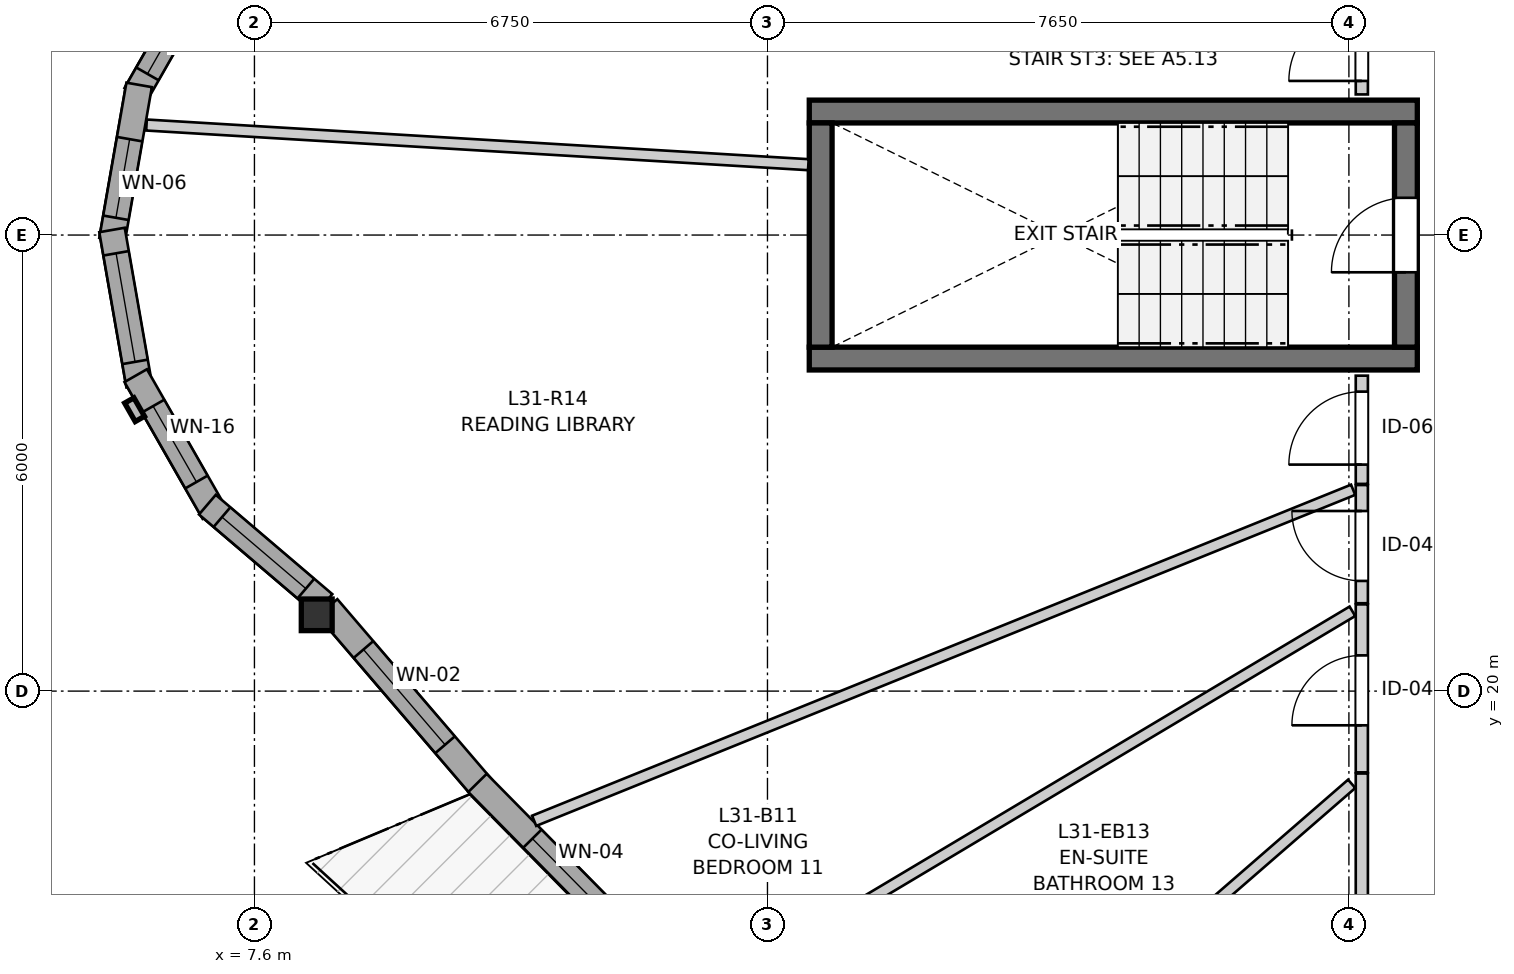
"""IFC4 building model, lengths in metres.
Left out: names, types, materials, properties, quantities, classifications, styles, units other than length and angle.
Written with IfcOpenShell. Run it as: python <this file> out.ifc"""

import sys

from ifc_helpers import new_model, si_unit, direction, frame, frame_2d, origin, origin_2d, place, context, subcontext, project, spatial, rectangle, i_section, extrude, source, transform, mapped, element, fill, save


model = new_model("IFC4")
c1 = context("Model", 3, precision=1e-05, world=origin(), true_north=direction((0.0, 1.0)))
c2 = subcontext(c1, "Body", "Model", "MODEL_VIEW")
j1 = project(units=[si_unit("LENGTHUNIT", "METRE"), si_unit("PLANEANGLEUNIT", "RADIAN")], contexts=[c1])
p1 = place(None, origin())
s1 = spatial("IfcSite", under=j1, at=p1, CompositionType="ELEMENT")
p2 = place(p1, origin())
s2 = spatial("IfcBuilding", under=s1, at=p2, CompositionType="ELEMENT")
p3 = place(p2, frame((0.0, 0.0, 105.6)))
s3 = spatial("IfcBuildingStorey", under=s2, at=p3, CompositionType="ELEMENT", Elevation=105.6)
for number, where, z_axis, x_axis in (
    (1, (14.9, 24.375, 0.0), (0.0, 0.0, 1.0), (1.0, 0.0, 0.0)),
    (2, (22.9, 27.625, 0.0), (0.0, 0.0, 1.0), (-1.0, 0.0, 0.0)),
):
    element("IfcWall", number, at=place(p3, frame(where, z_axis=z_axis, x_axis=x_axis)), inside=s3, PredefinedType="SHEAR", context=c2, shape_type="SweptSolid", body=[
        extrude(rectangle(XDim=8.0, YDim=0.3, at=frame_2d((4.0, 0.0))), origin(), (0.0, 0.0, 1.0), 2.935),
    ])
p4 = place(p3, frame((15.05, 27.475, 0.0), z_axis=(0.0, 0.0, 1.0), x_axis=(0.0, -1.0, 0.0)))
e3 = element("IfcWall", 3, at=p4, inside=s3, PredefinedType="SHEAR", context=c2, shape_type="SweptSolid", body=[
    extrude(rectangle(XDim=2.95, YDim=0.3, at=frame_2d((1.475, 0.0))), origin(), (0.0, 0.0, 1.0), 2.935),
])
p5 = place(p3, frame((22.75, 24.525, 0.0), z_axis=(0.0, 0.0, 1.0), x_axis=(0.0, 1.0, 0.0)))
e4 = element("IfcWall", 4, at=p5, inside=s3, PredefinedType="SHEAR", context=c2, shape_type="SweptSolid", body=[
    extrude(rectangle(XDim=2.95, YDim=0.3, at=frame_2d((1.475, 0.0))), origin(), (0.0, 0.0, 1.0), 2.935),
])
p6 = place(p5, frame((0.985, 0.0, 0.0)))
e5 = element("IfcOpeningElement", 5, at=p6, cuts=e4, PredefinedType="OPENING", context=c2, shape_type="SweptSolid", body=[
    extrude(rectangle(XDim=0.98, YDim=2.15, at=frame_2d((0.49, 1.075))), frame((0.0, 0.16, 0.0), z_axis=(0.0, -1.0, 0.0), x_axis=(1.0, 0.0, 0.0)), (0.0, 0.0, 1.0), 0.32),
])
m1 = source(origin(), c2, "Body", "SweptSolid", [
    extrude(i_section(OverallWidth=0.406, OverallDepth=0.416, WebThickness=0.027, FlangeThickness=0.044, FilletRadius=0.015, at=origin_2d()), origin(), (0.0, 0.0, 1.0), 2.935),
])
p7 = place(p3, frame((8.419, 21.004, 0.0), z_axis=(0.0, 0.0, 1.0), x_axis=(1.0, 0.0, 0.0)))
e6 = element("IfcColumn", 6, at=p7, inside=s3, PredefinedType="PILASTER", context=c2, shape_type="MappedRepresentation", body=[
    mapped(m1, transform((0.0, 0.0, 0.0), x_axis=(1.0, 0.0, 0.0), y_axis=(0.0, 1.0, 0.0), z_axis=(0.0, 0.0, 1.0), scale=1.0)),
])
p8 = place(p3, frame((7.066, 29.65, 0.0), z_axis=(0.0, 0.0, 1.0), x_axis=(-0.496037473582, -0.868301114132, 0.0)))
e7 = element("IfcWall", 7, at=p8, inside=s3, PredefinedType="SOLIDWALL", context=c2, shape_type="SweptSolid", body=[
    extrude(rectangle(XDim=2.073, YDim=0.34, at=frame_2d((1.037, 0.0))), origin(), (0.0, 0.0, 1.0), 2.465),
])
p9 = place(p8, frame((0.312, 0.0, 0.82)))
e8 = element("IfcOpeningElement", 8, at=p9, cuts=e7, PredefinedType="OPENING", context=c2, shape_type="SweptSolid", body=[
    extrude(rectangle(XDim=1.45, YDim=1.25, at=frame_2d((0.725, 0.625))), frame((0.0, 0.18, 0.0), z_axis=(0.0, -1.0, 0.0), x_axis=(1.0, 0.0, 0.0)), (0.0, 0.0, 1.0), 0.36),
])
p10 = place(p3, frame((6.083, 27.975, 0.0), z_axis=(0.0, 0.0, 1.0), x_axis=(-0.172186061474, -0.985064444711, 0.0)))
e9 = element("IfcWall", 9, at=p10, inside=s3, PredefinedType="SOLIDWALL", context=c2, shape_type="SweptSolid", body=[
    extrude(rectangle(XDim=2.073, YDim=0.34, at=frame_2d((1.037, 0.0))), origin(), (0.0, 0.0, 1.0), 2.465),
])
p11 = place(p10, frame((0.725, 0.0, 0.82)))
e10 = element("IfcOpeningElement", 10, at=p11, cuts=e9, PredefinedType="OPENING", context=c2, shape_type="SweptSolid", body=[
    extrude(rectangle(XDim=1.05, YDim=1.45, at=frame_2d((0.525, 0.725))), frame((0.0, 0.18, 0.0), z_axis=(0.0, -1.0, 0.0), x_axis=(1.0, 0.0, 0.0)), (0.0, 0.0, 1.0), 0.36),
])
p12 = place(p3, frame((5.726, 26.067, 0.0), z_axis=(0.0, 0.0, 1.0), x_axis=(0.172186061474, -0.985064444711, 0.0)))
e11 = element("IfcWall", 11, at=p12, inside=s3, PredefinedType="SOLIDWALL", context=c2, shape_type="SweptSolid", body=[
    extrude(rectangle(XDim=2.073, YDim=0.34, at=frame_2d((1.037, 0.0))), origin(), (0.0, 0.0, 1.0), 2.465),
])
p13 = place(p12, frame((0.312, 0.0, 0.82)))
e12 = element("IfcOpeningElement", 12, at=p13, cuts=e11, PredefinedType="OPENING", context=c2, shape_type="SweptSolid", body=[
    extrude(rectangle(XDim=1.45, YDim=1.25, at=frame_2d((0.725, 0.625))), frame((0.0, 0.18, 0.0), z_axis=(0.0, -1.0, 0.0), x_axis=(1.0, 0.0, 0.0)), (0.0, 0.0, 1.0), 0.36),
])
p14 = place(p3, frame((6.038, 24.15, 0.0), z_axis=(0.0, 0.0, 1.0), x_axis=(0.496037473582, -0.868301114132, 0.0)))
e13 = element("IfcWall", 13, at=p14, inside=s3, PredefinedType="SOLIDWALL", context=c2, shape_type="SweptSolid", body=[
    extrude(rectangle(XDim=2.073, YDim=0.34, at=frame_2d((1.037, 0.0))), origin(), (0.0, 0.0, 1.0), 2.465),
])
p15 = place(p14, frame((0.461, 0.0, 0.82)))
e14 = element("IfcOpeningElement", 14, at=p15, cuts=e13, PredefinedType="OPENING", context=c2, shape_type="SweptSolid", body=[
    extrude(rectangle(XDim=1.15, YDim=1.2, at=frame_2d((0.575, 0.6))), frame((0.0, 0.18, 0.0), z_axis=(0.0, -1.0, 0.0), x_axis=(1.0, 0.0, 0.0)), (0.0, 0.0, 1.0), 0.36),
])
p16 = place(p3, frame((6.981, 22.453, 0.0), z_axis=(0.0, 0.0, 1.0), x_axis=(0.761092561451, -0.648643286332, 0.0)))
e15 = element("IfcWall", 15, at=p16, inside=s3, PredefinedType="SOLIDWALL", context=c2, shape_type="SweptSolid", body=[
    extrude(rectangle(XDim=2.015, YDim=0.34, at=frame_2d((1.007, 0.0))), origin(), (0.0, 0.0, 1.0), 2.465),
])
p17 = place(p16, frame((0.252, 0.0, 0.82)))
e16 = element("IfcOpeningElement", 16, at=p17, cuts=e15, PredefinedType="OPENING", context=c2, shape_type="SweptSolid", body=[
    extrude(rectangle(XDim=1.45, YDim=1.25, at=frame_2d((0.725, 0.625))), frame((0.0, 0.18, 0.0), z_axis=(0.0, -1.0, 0.0), x_axis=(1.0, 0.0, 0.0)), (0.0, 0.0, 1.0), 0.36),
])
p18 = place(p3, frame((8.562, 21.099, 0.0), z_axis=(0.0, 0.0, 1.0), x_axis=(0.650778499588, -0.75926763692, 0.0)))
e17 = element("IfcWall", 17, at=p18, inside=s3, PredefinedType="SOLIDWALL", context=c2, shape_type="SweptSolid", body=[
    extrude(rectangle(XDim=3.124, YDim=0.34, at=frame_2d((1.562, 0.0))), origin(), (0.0, 0.0, 1.0), 2.465),
])
p19 = place(p18, frame((0.727, 0.0, 0.82)))
e18 = element("IfcOpeningElement", 18, at=p19, cuts=e17, PredefinedType="OPENING", context=c2, shape_type="SweptSolid", body=[
    extrude(rectangle(XDim=1.65, YDim=1.45, at=frame_2d((0.825, 0.725))), frame((0.0, 0.18, 0.0), z_axis=(0.0, -1.0, 0.0), x_axis=(1.0, 0.0, 0.0)), (0.0, 0.0, 1.0), 0.36),
])
p20 = place(p3, frame((10.535, 18.792, 0.0), z_axis=(0.0, 0.0, 1.0), x_axis=(0.701902141766, -0.7122733909, 0.0)))
e19 = element("IfcWall", 19, at=p20, inside=s3, PredefinedType="SOLIDWALL", context=c2, shape_type="SweptSolid", body=[
    extrude(rectangle(XDim=2.848, YDim=0.34, at=frame_2d((1.424, 0.0))), origin(), (0.0, 0.0, 1.0), 2.465),
])
p21 = place(p20, frame((1.029, 0.0, 0.82)))
e20 = element("IfcOpeningElement", 20, at=p21, cuts=e19, PredefinedType="OPENING", context=c2, shape_type="SweptSolid", body=[
    extrude(rectangle(XDim=1.35, YDim=1.45, at=frame_2d((0.675, 0.725))), frame((0.0, 0.18, 0.0), z_axis=(0.0, -1.0, 0.0), x_axis=(1.0, 0.0, 0.0)), (0.0, 0.0, 1.0), 0.36),
])
p22 = place(p3, frame((22.17, 15.57, 0.0), z_axis=(0.0, 0.0, 1.0), x_axis=(0.0, 1.0, 0.0)))
e21 = element("IfcWall", 21, at=p22, inside=s3, PredefinedType="PARTITIONING", context=c2, shape_type="SweptSolid", body=[
    extrude(rectangle(XDim=3.346, YDim=0.16, at=frame_2d((1.673, 0.0))), origin(), (0.0, 0.0, 1.0), 2.935),
])
p23 = place(p22, frame((0.22, 0.0, 0.0)))
e22 = element("IfcOpeningElement", 22, at=p23, cuts=e21, PredefinedType="OPENING", context=c2, shape_type="SweptSolid", body=[
    extrude(rectangle(XDim=0.92, YDim=2.1, at=frame_2d((0.46, 1.05))), frame((0.0, 0.09, 0.0), z_axis=(0.0, -1.0, 0.0), x_axis=(1.0, 0.0, 0.0)), (0.0, 0.0, 1.0), 0.18),
])
p24 = place(p3, frame((22.17, 18.931, 0.0), z_axis=(0.0, 0.0, 1.0), x_axis=(0.0, 1.0, 0.0)))
e23 = element("IfcWall", 23, at=p24, inside=s3, PredefinedType="PARTITIONING", context=c2, shape_type="SweptSolid", body=[
    extrude(rectangle(XDim=2.21, YDim=0.16, at=frame_2d((1.105, 0.0))), origin(), (0.0, 0.0, 1.0), 2.935),
])
p25 = place(p24, frame((0.619, 0.0, 0.0)))
e24 = element("IfcOpeningElement", 24, at=p25, cuts=e23, PredefinedType="OPENING", context=c2, shape_type="SweptSolid", body=[
    extrude(rectangle(XDim=0.92, YDim=2.1, at=frame_2d((0.46, 1.05))), frame((0.0, 0.09, 0.0), z_axis=(0.0, -1.0, 0.0), x_axis=(1.0, 0.0, 0.0)), (0.0, 0.0, 1.0), 0.18),
])
p26 = place(p3, frame((22.17, 21.156, 0.0), z_axis=(0.0, 0.0, 1.0), x_axis=(0.0, 1.0, 0.0)))
e25 = element("IfcWall", 25, at=p26, inside=s3, PredefinedType="PARTITIONING", context=c2, shape_type="SweptSolid", body=[
    extrude(rectangle(XDim=1.555, YDim=0.16, at=frame_2d((0.777, 0.0))), origin(), (0.0, 0.0, 1.0), 2.935),
])
p27 = place(p26, frame((0.293, 0.0, 0.0)))
e26 = element("IfcOpeningElement", 26, at=p27, cuts=e25, PredefinedType="OPENING", context=c2, shape_type="SweptSolid", body=[
    extrude(rectangle(XDim=0.92, YDim=2.1, at=frame_2d((0.46, 1.05))), frame((0.0, 0.09, 0.0), z_axis=(0.0, -1.0, 0.0), x_axis=(1.0, 0.0, 0.0)), (0.0, 0.0, 1.0), 0.18),
])
p28 = place(p3, frame((22.17, 22.726, 0.0), z_axis=(0.0, 0.0, 1.0), x_axis=(0.0, 1.0, 0.0)))
e27 = element("IfcWall", 27, at=p28, inside=s3, PredefinedType="PARTITIONING", context=c2, shape_type="SweptSolid", body=[
    extrude(rectangle(XDim=1.424, YDim=0.16, at=frame_2d((0.712, 0.0))), origin(), (0.0, 0.0, 1.0), 2.935),
])
p29 = place(p28, frame((0.254, 0.0, 0.0)))
e28 = element("IfcOpeningElement", 28, at=p29, cuts=e27, PredefinedType="OPENING", context=c2, shape_type="SweptSolid", body=[
    extrude(rectangle(XDim=0.96, YDim=2.1, at=frame_2d((0.48, 1.05))), frame((0.0, 0.09, 0.0), z_axis=(0.0, -1.0, 0.0), x_axis=(1.0, 0.0, 0.0)), (0.0, 0.0, 1.0), 0.18),
])
p30 = place(p3, frame((22.17, 27.85, 0.0), z_axis=(0.0, 0.0, 1.0), x_axis=(0.0, 1.0, 0.0)))
e29 = element("IfcWall", 29, at=p30, inside=s3, PredefinedType="PARTITIONING", context=c2, shape_type="SweptSolid", body=[
    extrude(rectangle(XDim=1.283, YDim=0.16, at=frame_2d((0.642, 0.0))), origin(), (0.0, 0.0, 1.0), 2.935),
])
p31 = place(p30, frame((0.177, 0.0, 0.0)))
e30 = element("IfcOpeningElement", 30, at=p31, cuts=e29, PredefinedType="OPENING", context=c2, shape_type="SweptSolid", body=[
    extrude(rectangle(XDim=0.96, YDim=2.1, at=frame_2d((0.48, 1.05))), frame((0.0, 0.09, 0.0), z_axis=(0.0, -1.0, 0.0), x_axis=(1.0, 0.0, 0.0)), (0.0, 0.0, 1.0), 0.18),
])
p32 = place(p3, frame((11.28, 18.294, 0.0), z_axis=(0.0, 0.0, 1.0), x_axis=(0.927137862507, 0.374720407645, 0.0)))
e31 = element("IfcWall", 31, at=p32, inside=s3, PredefinedType="PARTITIONING", context=c2, shape_type="SweptSolid", body=[
    extrude(rectangle(XDim=11.622, YDim=0.145, at=frame_2d((5.811, 0.0))), origin(), (0.0, 0.0, 1.0), 2.935),
])
p33 = place(p3, frame((13.622, 16.028, 0.0), z_axis=(0.0, 0.0, 1.0), x_axis=(0.85896108151, 0.512040877716, 0.0)))
e32 = element("IfcWall", 32, at=p33, inside=s3, PredefinedType="PARTITIONING", context=c2, shape_type="SweptSolid", body=[
    extrude(rectangle(XDim=9.807, YDim=0.145, at=frame_2d((4.904, 0.0))), origin(), (0.0, 0.0, 1.0), 2.935),
])
p34 = place(p3, frame((6.18, 27.448, 0.0), z_axis=(0.0, 0.0, 1.0), x_axis=(0.998209995059, -0.059806402362, 0.0)))
e33 = element("IfcWall", 33, at=p34, inside=s3, PredefinedType="PARTITIONING", context=c2, shape_type="SweptSolid", body=[
    extrude(rectangle(XDim=8.724, YDim=0.145, at=frame_2d((4.362, 0.0))), origin(), (0.0, 0.0, 1.0), 2.935),
])
p35 = place(p3, frame((19.736, 16.782, 0.0), z_axis=(0.0, 0.0, 1.0), x_axis=(0.754964216329, 0.655765988796, 0.0)))
e34 = element("IfcWall", 34, at=p35, inside=s3, PredefinedType="PARTITIONING", context=c2, shape_type="SweptSolid", body=[
    extrude(rectangle(XDim=3.047, YDim=0.145, at=frame_2d((1.523, 0.0))), origin(), (0.0, 0.0, 1.0), 2.935),
])
m2 = source(origin(), c2, "Body", "SweptSolid", [
    extrude(rectangle(XDim=1.45, YDim=1.25, at=frame_2d((0.725, 0.625))), frame((0.0, 0.03, 0.0), z_axis=(0.0, -1.0, 0.0), x_axis=(1.0, 0.0, 0.0)), (0.0, 0.0, 1.0), 0.06),
])
p36 = place(p9, origin())
e35 = element("IfcWindow", 35, at=p36, inside=s3, PartitioningType="SINGLE_PANEL", PredefinedType="WINDOW", context=c2, shape_type="MappedRepresentation", body=[
    mapped(m2, transform((0.0, 0.0, 0.0), x_axis=(1.0, 0.0, 0.0), y_axis=(0.0, 1.0, 0.0), z_axis=(0.0, 0.0, 1.0), scale=1.0)),
])
fill(e8, e35)
m3 = source(origin(), c2, "Body", "SweptSolid", [
    extrude(rectangle(XDim=1.05, YDim=1.45, at=frame_2d((0.525, 0.725))), frame((0.0, 0.03, 0.0), z_axis=(0.0, -1.0, 0.0), x_axis=(1.0, 0.0, 0.0)), (0.0, 0.0, 1.0), 0.06),
])
p37 = place(p11, origin())
e36 = element("IfcWindow", 36, at=p37, inside=s3, PartitioningType="SINGLE_PANEL", PredefinedType="WINDOW", context=c2, shape_type="MappedRepresentation", body=[
    mapped(m3, transform((0.0, 0.0, 0.0), x_axis=(1.0, 0.0, 0.0), y_axis=(0.0, 1.0, 0.0), z_axis=(0.0, 0.0, 1.0), scale=1.0)),
])
fill(e10, e36)
p38 = place(p13, origin())
e37 = element("IfcWindow", 37, at=p38, inside=s3, PartitioningType="SINGLE_PANEL", PredefinedType="WINDOW", context=c2, shape_type="MappedRepresentation", body=[
    mapped(m2, transform((0.0, 0.0, 0.0), x_axis=(1.0, 0.0, 0.0), y_axis=(0.0, 1.0, 0.0), z_axis=(0.0, 0.0, 1.0), scale=1.0)),
])
fill(e12, e37)
m4 = source(origin(), c2, "Body", "SweptSolid", [
    extrude(rectangle(XDim=1.15, YDim=1.2, at=frame_2d((0.575, 0.6))), frame((0.0, 0.03, 0.0), z_axis=(0.0, -1.0, 0.0), x_axis=(1.0, 0.0, 0.0)), (0.0, 0.0, 1.0), 0.06),
])
p39 = place(p15, origin())
e38 = element("IfcWindow", 38, at=p39, inside=s3, PartitioningType="SINGLE_PANEL", PredefinedType="WINDOW", context=c2, shape_type="MappedRepresentation", body=[
    mapped(m4, transform((0.0, 0.0, 0.0), x_axis=(1.0, 0.0, 0.0), y_axis=(0.0, 1.0, 0.0), z_axis=(0.0, 0.0, 1.0), scale=1.0)),
])
fill(e14, e38)
p40 = place(p17, origin())
e39 = element("IfcWindow", 39, at=p40, inside=s3, PartitioningType="SINGLE_PANEL", PredefinedType="WINDOW", context=c2, shape_type="MappedRepresentation", body=[
    mapped(m2, transform((0.0, 0.0, 0.0), x_axis=(1.0, 0.0, 0.0), y_axis=(0.0, 1.0, 0.0), z_axis=(0.0, 0.0, 1.0), scale=1.0)),
])
fill(e16, e39)
m5 = source(origin(), c2, "Body", "SweptSolid", [
    extrude(rectangle(XDim=1.65, YDim=1.45, at=frame_2d((0.825, 0.725))), frame((0.0, 0.03, 0.0), z_axis=(0.0, -1.0, 0.0), x_axis=(1.0, 0.0, 0.0)), (0.0, 0.0, 1.0), 0.06),
])
p41 = place(p19, origin())
e40 = element("IfcWindow", 40, at=p41, inside=s3, PartitioningType="SINGLE_PANEL", PredefinedType="WINDOW", context=c2, shape_type="MappedRepresentation", body=[
    mapped(m5, transform((0.0, 0.0, 0.0), x_axis=(1.0, 0.0, 0.0), y_axis=(0.0, 1.0, 0.0), z_axis=(0.0, 0.0, 1.0), scale=1.0)),
])
fill(e18, e40)
m6 = source(origin(), c2, "Body", "SweptSolid", [
    extrude(rectangle(XDim=1.35, YDim=1.45, at=frame_2d((0.675, 0.725))), frame((0.0, 0.03, 0.0), z_axis=(0.0, -1.0, 0.0), x_axis=(1.0, 0.0, 0.0)), (0.0, 0.0, 1.0), 0.06),
])
p42 = place(p21, origin())
e41 = element("IfcWindow", 41, at=p42, inside=s3, PartitioningType="SINGLE_PANEL", PredefinedType="WINDOW", context=c2, shape_type="MappedRepresentation", body=[
    mapped(m6, transform((0.0, 0.0, 0.0), x_axis=(1.0, 0.0, 0.0), y_axis=(0.0, 1.0, 0.0), z_axis=(0.0, 0.0, 1.0), scale=1.0)),
])
fill(e20, e41)
m7 = source(origin(), c2, "Body", "SweptSolid", [
    extrude(rectangle(XDim=0.98, YDim=2.15, at=frame_2d((0.49, 1.075))), frame((0.0, 0.025, 0.0), z_axis=(0.0, -1.0, 0.0), x_axis=(1.0, 0.0, 0.0)), (0.0, 0.0, 1.0), 0.05),
])
p43 = place(p6, origin())
e42 = element("IfcDoor", 42, at=p43, inside=s3, OperationType="SINGLE_SWING_LEFT", PredefinedType="DOOR", context=c2, shape_type="MappedRepresentation", body=[
    mapped(m7, transform((0.0, 0.0, 0.0), x_axis=(1.0, 0.0, 0.0), y_axis=(0.0, 1.0, 0.0), z_axis=(0.0, 0.0, 1.0), scale=1.0)),
])
fill(e5, e42)
m8 = source(origin(), c2, "Body", "SweptSolid", [
    extrude(rectangle(XDim=0.92, YDim=2.1, at=frame_2d((0.46, 1.05))), frame((0.0, 0.025, 0.0), z_axis=(0.0, -1.0, 0.0), x_axis=(1.0, 0.0, 0.0)), (0.0, 0.0, 1.0), 0.05),
])
p44 = place(p25, origin())
e43 = element("IfcDoor", 43, at=p44, inside=s3, OperationType="SINGLE_SWING_LEFT", PredefinedType="DOOR", context=c2, shape_type="MappedRepresentation", body=[
    mapped(m8, transform((0.0, 0.0, 0.0), x_axis=(1.0, 0.0, 0.0), y_axis=(0.0, 1.0, 0.0), z_axis=(0.0, 0.0, 1.0), scale=1.0)),
])
fill(e24, e43)
p45 = place(p27, origin())
e44 = element("IfcDoor", 44, at=p45, inside=s3, OperationType="SINGLE_SWING_RIGHT", PredefinedType="DOOR", context=c2, shape_type="MappedRepresentation", body=[
    mapped(m8, transform((0.0, 0.0, 0.0), x_axis=(1.0, 0.0, 0.0), y_axis=(0.0, 1.0, 0.0), z_axis=(0.0, 0.0, 1.0), scale=1.0)),
])
fill(e26, e44)
m9 = source(origin(), c2, "Body", "SweptSolid", [
    extrude(rectangle(XDim=0.96, YDim=2.1, at=frame_2d((0.48, 1.05))), frame((0.0, 0.025, 0.0), z_axis=(0.0, -1.0, 0.0), x_axis=(1.0, 0.0, 0.0)), (0.0, 0.0, 1.0), 0.05),
])
p46 = place(p29, origin())
e45 = element("IfcDoor", 45, at=p46, inside=s3, OperationType="SINGLE_SWING_LEFT", PredefinedType="DOOR", context=c2, shape_type="MappedRepresentation", body=[
    mapped(m9, transform((0.0, 0.0, 0.0), x_axis=(1.0, 0.0, 0.0), y_axis=(0.0, 1.0, 0.0), z_axis=(0.0, 0.0, 1.0), scale=1.0)),
])
fill(e28, e45)
p47 = place(p31, origin())
e46 = element("IfcDoor", 46, at=p47, inside=s3, OperationType="SINGLE_SWING_LEFT", PredefinedType="DOOR", context=c2, shape_type="MappedRepresentation", body=[
    mapped(m9, transform((0.0, 0.0, 0.0), x_axis=(1.0, 0.0, 0.0), y_axis=(0.0, 1.0, 0.0), z_axis=(0.0, 0.0, 1.0), scale=1.0)),
])
fill(e30, e46)
save(model, sys.argv[1])
